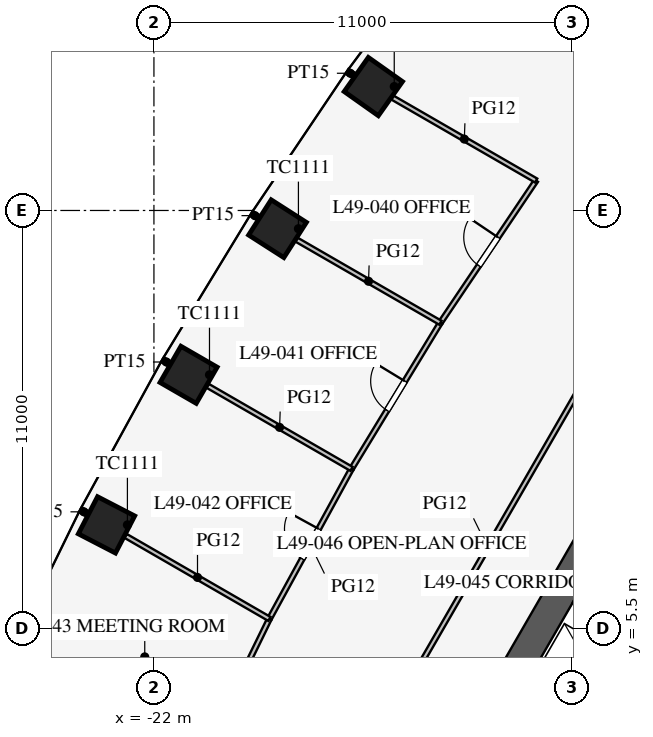
"""IFC4 building model, lengths in metres.
Left out: names, types, materials, properties, quantities, classifications, styles, units other than length and angle.
Written with IfcOpenShell. Run it as: python <this file> out.ifc"""

import sys

from ifc_helpers import new_model, si_unit, direction, frame, frame_2d, origin, origin_2d, place, context, subcontext, project, spatial, rectangle, extrude, element, fill, save


model = new_model("IFC4")
c1 = context("Model", 3, precision=1e-05, world=origin(), true_north=direction((0.0, 1.0)))
c2 = subcontext(c1, "Body", "Model", "MODEL_VIEW")
j1 = project(units=[si_unit("LENGTHUNIT", "METRE"), si_unit("PLANEANGLEUNIT", "RADIAN")], contexts=[c1])
p1 = place(None, origin())
s1 = spatial("IfcSite", under=j1, at=p1, CompositionType="ELEMENT")
p2 = place(p1, origin())
s2 = spatial("IfcBuilding", under=s1, at=p2, CompositionType="ELEMENT")
p3 = place(p2, frame((0.0, 0.0, 214.9)))
s3 = spatial("IfcBuildingStorey", under=s2, at=p3, CompositionType="ELEMENT", Elevation=214.9)
for number, where, z_axis, x_axis in (
    (1, (-16.227, 19.761, 0.0), (0.0, 0.0, 1.0), (-0.577, -0.816, 0.0)),
    (2, (-18.748, 16.02, 0.0), (0.0, 0.0, 1.0), (-0.539, -0.842, 0.0)),
    (3, (-21.088, 12.175, 0.0), (0.0, 0.0, 1.0), (-0.5, -0.866, 0.0)),
    (4, (-23.248, 8.226, 0.0), (0.0, 0.0, 1.0), (-0.46, -0.888, 0.0)),
    (5, (-25.227, 4.172, 0.0), (0.0, 0.0, 1.0), (-0.418, -0.908, 0.0)),
):
    element("IfcColumn", number, at=place(p3, frame(where, z_axis=z_axis, x_axis=x_axis)), inside=s3, PredefinedType="COLUMN", context=c2, shape_type="SweptSolid", body=[
        extrude(rectangle(XDim=1.1, YDim=1.1, at=origin_2d()), origin(), (0.0, 0.0, 1.0), 4.2),
    ])
p4 = place(p3, frame((-5.773, 16.0, 0.0), z_axis=(0.0, 0.0, 1.0), x_axis=(-0.500002442456, -0.866023993627, 0.0)))
e6 = element("IfcWall", 6, at=p4, inside=s3, PredefinedType="SHEAR", context=c2, shape_type="SweptSolid", body=[
    extrude(rectangle(XDim=21.939, YDim=0.8, at=frame_2d((10.97, 0.0))), origin(), (0.0, 0.0, 1.0), 4.2),
])
p5 = place(p4, frame((17.27, 0.0, 0.0)))
e7 = element("IfcOpeningElement", 7, at=p5, cuts=e6, PredefinedType="OPENING", context=c2, shape_type="SweptSolid", body=[
    extrude(rectangle(XDim=1.2, YDim=2.1, at=frame_2d((0.6, 1.05))), frame((0.0, 0.41, 0.0), z_axis=(0.0, -1.0, 0.0), x_axis=(1.0, 0.0, 0.0)), (0.0, 0.0, 1.0), 0.82),
])
p6 = place(p4, frame((3.47, 0.0, 0.0)))
e8 = element("IfcOpeningElement", 8, at=p6, cuts=e6, PredefinedType="OPENING", context=c2, shape_type="SweptSolid", body=[
    extrude(rectangle(XDim=1.2, YDim=2.1, at=frame_2d((0.6, 1.05))), frame((0.0, 0.41, 0.0), z_axis=(0.0, -1.0, 0.0), x_axis=(1.0, 0.0, 0.0)), (0.0, 0.0, 1.0), 0.82),
])
p7 = place(p3, frame((-5.724, 9.886, 0.0), z_axis=(0.0, 0.0, 1.0), x_axis=(-0.500001763848, -0.866024385424, 0.0)))
e9 = element("IfcWall", 9, at=p7, inside=s3, PredefinedType="SHEAR", context=c2, shape_type="SweptSolid", body=[
    extrude(rectangle(XDim=11.4, YDim=0.25, at=frame_2d((5.7, 0.0))), origin(), (0.0, 0.0, 1.0), 4.2),
])
p8 = place(p7, frame((6.525, 0.0, 0.0)))
e10 = element("IfcOpeningElement", 10, at=p8, cuts=e9, PredefinedType="OPENING", context=c2, shape_type="SweptSolid", body=[
    extrude(rectangle(XDim=1.2, YDim=2.2, at=frame_2d((0.6, 1.1))), frame((0.0, 0.135, 0.0), z_axis=(0.0, -1.0, 0.0), x_axis=(1.0, 0.0, 0.0)), (0.0, 0.0, 1.0), 0.27),
])
p9 = place(p7, frame((9.375, 0.0, 0.0)))
e11 = element("IfcOpeningElement", 11, at=p9, cuts=e9, PredefinedType="OPENING", context=c2, shape_type="SweptSolid", body=[
    extrude(rectangle(XDim=1.2, YDim=2.2, at=frame_2d((0.6, 1.1))), frame((0.0, 0.135, 0.0), z_axis=(0.0, -1.0, 0.0), x_axis=(1.0, 0.0, 0.0)), (0.0, 0.0, 1.0), 0.27),
])
p10 = place(p3, frame((-8.682, 5.012, 0.0), z_axis=(0.0, 0.0, 1.0), x_axis=(-0.866005588531, 0.500034319456, 0.0)))
e12 = element("IfcWall", 12, at=p10, inside=s3, PredefinedType="SHEAR", context=c2, shape_type="SweptSolid", body=[
    extrude(rectangle(XDim=2.575, YDim=0.25, at=frame_2d((1.288, 0.0))), origin(), (0.0, 0.0, 1.0), 4.2),
])
p11 = place(p3, frame((-0.016, 30.491, 0.0), z_axis=(0.0, 0.0, 1.0), x_axis=(-0.50000091641, -0.866024874695, 0.0)))
e13 = element("IfcWall", 13, at=p11, inside=s3, PredefinedType="PARTITIONING", context=c2, shape_type="SweptSolid", body=[
    extrude(rectangle(XDim=52.796, YDim=0.12, at=frame_2d((26.398, 0.0))), origin(), (0.0, 0.0, 1.0), 2.9),
])
p12 = place(p11, frame((10.2, 0.0, 0.15)))
e14 = element("IfcOpeningElement", 14, at=p12, cuts=e13, PredefinedType="OPENING", context=c2, shape_type="SweptSolid", body=[
    extrude(rectangle(XDim=1.8, YDim=2.1, at=frame_2d((0.9, 1.05))), frame((0.0, 0.07, 0.0), z_axis=(0.0, -1.0, 0.0), x_axis=(1.0, 0.0, 0.0)), (0.0, 0.0, 1.0), 0.14),
])
p13 = place(p11, frame((40.8, 0.0, 0.15)))
e15 = element("IfcOpeningElement", 15, at=p13, cuts=e13, PredefinedType="OPENING", context=c2, shape_type="SweptSolid", body=[
    extrude(rectangle(XDim=1.8, YDim=2.1, at=frame_2d((0.9, 1.05))), frame((0.0, 0.07, 0.0), z_axis=(0.0, -1.0, 0.0), x_axis=(1.0, 0.0, 0.0)), (0.0, 0.0, 1.0), 0.14),
])
p14 = place(p3, frame((-21.568, 12.452, 0.0), z_axis=(0.0, 0.0, 1.0), x_axis=(-0.866303639744, 0.499517771221, 0.0)))
e16 = element("IfcWall", 16, at=p14, inside=s3, PredefinedType="PARTITIONING", context=c2, shape_type="SweptSolid", body=[
    extrude(rectangle(XDim=0.241, YDim=0.15, at=frame_2d((0.121, 0.0))), origin(), (0.0, 0.0, 1.0), 2.9),
])
for number, where, z_axis, x_axis in (
    (17, (-23.749, 8.515, 0.0), (0.0, 0.0, 1.0), (-0.866, 0.5, 0.0)),
    (18, (-19.249, 16.31, 0.0), (0.0, 0.0, 1.0), (-0.866, 0.5, 0.0)),
):
    element("IfcWall", number, at=place(p3, frame(where, z_axis=z_axis, x_axis=x_axis)), inside=s3, PredefinedType="PARTITIONING", context=c2, shape_type="SweptSolid", body=[
        extrude(rectangle(XDim=0.217, YDim=0.15, at=frame_2d((0.108, 0.0))), origin(), (0.0, 0.0, 1.0), 2.9),
    ])
p15 = place(p3, frame((-16.748, 20.062, 0.0), z_axis=(0.0, 0.0, 1.0), x_axis=(-0.865625187776, 0.500692554656, 0.0)))
e19 = element("IfcWall", 19, at=p15, inside=s3, PredefinedType="PARTITIONING", context=c2, shape_type="SweptSolid", body=[
    extrude(rectangle(XDim=0.196, YDim=0.15, at=frame_2d((0.098, 0.0))), origin(), (0.0, 0.0, 1.0), 2.9),
])
p16 = place(p3, frame((-16.802, 9.7, 0.0), z_axis=(0.0, 0.0, 1.0), x_axis=(-0.479949984371, -0.877295852322, 0.0)))
e20 = element("IfcWall", 20, at=p16, inside=s3, PredefinedType="PARTITIONING", context=c2, shape_type="SweptSolid", body=[
    extrude(rectangle(XDim=4.501, YDim=0.12, at=frame_2d((2.25, 0.0))), origin(), (0.0, 0.0, 1.0), 2.9),
])
p17 = place(p16, frame((1.8, 0.0, 0.15)))
e21 = element("IfcOpeningElement", 21, at=p17, cuts=e20, PredefinedType="OPENING", context=c2, shape_type="SweptSolid", body=[
    extrude(rectangle(XDim=0.9, YDim=2.1, at=frame_2d((0.45, 1.05))), frame((0.0, 0.07, 0.0), z_axis=(0.0, -1.0, 0.0), x_axis=(1.0, 0.0, 0.0)), (0.0, 0.0, 1.0), 0.14),
])
p18 = place(p3, frame((-18.962, 5.751, 0.0), z_axis=(0.0, 0.0, 1.0), x_axis=(-0.43911984878, -0.898428493764, 0.0)))
e22 = element("IfcWall", 22, at=p18, inside=s3, PredefinedType="PARTITIONING", context=c2, shape_type="SweptSolid", body=[
    extrude(rectangle(XDim=4.511, YDim=0.12, at=frame_2d((2.255, 0.0))), origin(), (0.0, 0.0, 1.0), 2.9),
])
p19 = place(p18, frame((1.75, 0.0, 0.15)))
e23 = element("IfcOpeningElement", 23, at=p19, cuts=e22, PredefinedType="OPENING", context=c2, shape_type="SweptSolid", body=[
    extrude(rectangle(XDim=1.0, YDim=2.1, at=frame_2d((0.5, 1.05))), frame((0.0, 0.07, 0.0), z_axis=(0.0, -1.0, 0.0), x_axis=(1.0, 0.0, 0.0)), (0.0, 0.0, 1.0), 0.14),
])
p20 = place(p3, frame((-14.462, 13.546, 0.0), z_axis=(0.0, 0.0, 1.0), x_axis=(-0.519790350351, -0.85429385558, 0.0)))
e24 = element("IfcWall", 24, at=p20, inside=s3, PredefinedType="PARTITIONING", context=c2, shape_type="SweptSolid", body=[
    extrude(rectangle(XDim=4.501, YDim=0.12, at=frame_2d((2.25, 0.0))), origin(), (0.0, 0.0, 1.0), 2.9),
])
p21 = place(p20, frame((1.8, 0.0, 0.15)))
e25 = element("IfcOpeningElement", 25, at=p21, cuts=e24, PredefinedType="OPENING", context=c2, shape_type="SweptSolid", body=[
    extrude(rectangle(XDim=0.9, YDim=2.1, at=frame_2d((0.45, 1.05))), frame((0.0, 0.07, 0.0), z_axis=(0.0, -1.0, 0.0), x_axis=(1.0, 0.0, 0.0)), (0.0, 0.0, 1.0), 0.14),
])
p22 = place(p3, frame((-11.943, 17.287, 0.0), z_axis=(0.0, 0.0, 1.0), x_axis=(-0.55850386778, -0.829501916619, 0.0)))
e26 = element("IfcWall", 26, at=p22, inside=s3, PredefinedType="PARTITIONING", context=c2, shape_type="SweptSolid", body=[
    extrude(rectangle(XDim=4.511, YDim=0.12, at=frame_2d((2.255, 0.0))), origin(), (0.0, 0.0, 1.0), 2.9),
])
p23 = place(p22, frame((1.8, 0.0, 0.15)))
e27 = element("IfcOpeningElement", 27, at=p23, cuts=e26, PredefinedType="OPENING", context=c2, shape_type="SweptSolid", body=[
    extrude(rectangle(XDim=0.9, YDim=2.1, at=frame_2d((0.45, 1.05))), frame((0.0, 0.07, 0.0), z_axis=(0.0, -1.0, 0.0), x_axis=(1.0, 0.0, 0.0)), (0.0, 0.0, 1.0), 0.14),
])
p24 = place(p3, frame((-16.802, 9.7, 0.0), z_axis=(0.0, 0.0, 1.0), x_axis=(-0.866037657489, 0.499978775361, 0.0)))
e28 = element("IfcWall", 28, at=p24, inside=s3, PredefinedType="PARTITIONING", context=c2, shape_type="SweptSolid", body=[
    extrude(rectangle(XDim=4.37, YDim=0.12, at=frame_2d((2.185, 0.0))), origin(), (0.0, 0.0, 1.0), 2.9),
])
for number, where, z_axis, x_axis in (
    (29, (-18.962, 5.751, 0.0), (0.0, 0.0, 1.0), (-0.866, 0.5, 0.0)),
    (30, (-14.462, 13.546, 0.0), (0.0, 0.0, 1.0), (-0.866, 0.5, 0.0)),
):
    element("IfcWall", number, at=place(p3, frame(where, z_axis=z_axis, x_axis=x_axis)), inside=s3, PredefinedType="PARTITIONING", context=c2, shape_type="SweptSolid", body=[
        extrude(rectangle(XDim=4.368, YDim=0.12, at=frame_2d((2.184, 0.0))), origin(), (0.0, 0.0, 1.0), 2.9),
    ])
p25 = place(p3, frame((-11.943, 17.287, 0.0), z_axis=(0.0, 0.0, 1.0), x_axis=(-0.866024423162, 0.500001698484, 0.0)))
e31 = element("IfcWall", 31, at=p25, inside=s3, PredefinedType="PARTITIONING", context=c2, shape_type="SweptSolid", body=[
    extrude(rectangle(XDim=4.364, YDim=0.12, at=frame_2d((2.182, 0.0))), origin(), (0.0, 0.0, 1.0), 2.9),
])
p26 = place(p23, frame((0.9, 0.0, 0.0), z_axis=(0.0, 0.0, 1.0), x_axis=(-1.0, 0.0, 0.0)))
e32 = element("IfcDoor", 32, at=p26, inside=s3, OperationType="SINGLE_SWING_RIGHT", PredefinedType="DOOR", context=c2, shape_type="SweptSolid", body=[
    extrude(rectangle(XDim=0.9, YDim=2.1, at=frame_2d((0.45, 1.05))), frame((0.0, 0.025, 0.0), z_axis=(0.0, -1.0, 0.0), x_axis=(1.0, 0.0, 0.0)), (0.0, 0.0, 1.0), 0.05),
])
fill(e27, e32)
p27 = place(p21, frame((0.9, 0.0, 0.0), z_axis=(0.0, 0.0, 1.0), x_axis=(-1.0, 0.0, 0.0)))
e33 = element("IfcDoor", 33, at=p27, inside=s3, OperationType="SINGLE_SWING_RIGHT", PredefinedType="DOOR", context=c2, shape_type="SweptSolid", body=[
    extrude(rectangle(XDim=0.9, YDim=2.1, at=frame_2d((0.45, 1.05))), frame((0.0, 0.025, 0.0), z_axis=(0.0, -1.0, 0.0), x_axis=(1.0, 0.0, 0.0)), (0.0, 0.0, 1.0), 0.05),
])
fill(e25, e33)
p28 = place(p17, frame((0.9, 0.0, 0.0), z_axis=(0.0, 0.0, 1.0), x_axis=(-1.0, 0.0, 0.0)))
e34 = element("IfcDoor", 34, at=p28, inside=s3, OperationType="SINGLE_SWING_RIGHT", PredefinedType="DOOR", context=c2, shape_type="SweptSolid", body=[
    extrude(rectangle(XDim=0.9, YDim=2.1, at=frame_2d((0.45, 1.05))), frame((0.0, 0.025, 0.0), z_axis=(0.0, -1.0, 0.0), x_axis=(1.0, 0.0, 0.0)), (0.0, 0.0, 1.0), 0.05),
])
fill(e21, e34)
save(model, sys.argv[1])
